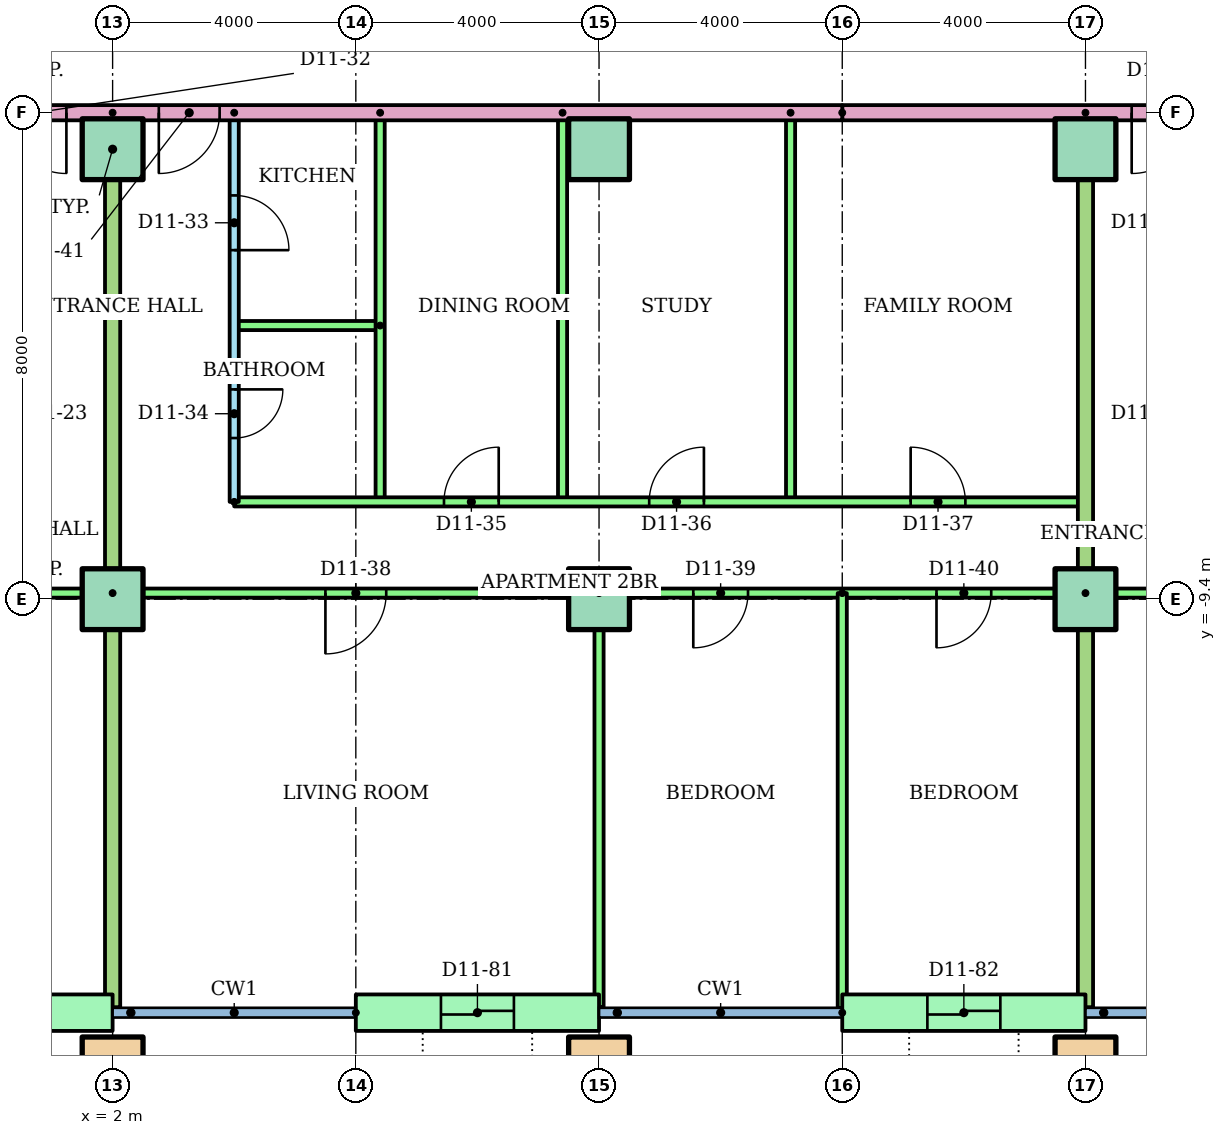
"""IFC4 building model, lengths in metres.
Left out: names, types, materials, properties, quantities, classifications, styles, units other than length and angle.
Written with IfcOpenShell. Run it as: python <this file> out.ifc"""

import sys

from ifc_helpers import new_model, si_unit, direction, frame, frame_2d, origin, origin_2d, place, context, subcontext, project, spatial, rectangle, hollow_rectangle, extrude, element, fill, save


model = new_model("IFC4")
c1 = context("Model", 3, precision=1e-05, world=origin(), true_north=direction((0.0, 1.0)))
c2 = subcontext(c1, "Body", "Model", "MODEL_VIEW")
j1 = project(units=[si_unit("LENGTHUNIT", "METRE"), si_unit("PLANEANGLEUNIT", "RADIAN")], contexts=[c1])
p1 = place(None, origin())
s1 = spatial("IfcSite", under=j1, at=p1, CompositionType="ELEMENT")
p2 = place(p1, origin())
s2 = spatial("IfcBuilding", under=s1, at=p2, CompositionType="ELEMENT")
p3 = place(p2, frame((0.0, 0.0, 44.8)))
s3 = spatial("IfcBuildingStorey", under=s2, at=p3, CompositionType="ELEMENT", Elevation=44.8)
for number, where in (
    (1, (2.0, -17.1, 0.0)),
    (2, (10.0, -17.1, 0.0)),
    (3, (18.0, -17.1, 0.0)),
):
    element("IfcColumn", number, at=place(p3, frame(where)), inside=s3, PredefinedType="COLUMN", context=c2, shape_type="SweptSolid", body=[
        extrude(hollow_rectangle(XDim=1.0, YDim=1.0, WallThickness=0.05, at=origin_2d()), origin(), (0.0, 0.0, 1.0), 3.2),
    ])
for number, where in (
    (4, (2.0, -9.4, 0.0)),
    (5, (10.0, -9.4, 0.0)),
    (6, (18.0, -9.4, 0.0)),
    (7, (2.0, -2.0, 0.0)),
    (8, (10.0, -2.0, 0.0)),
    (9, (18.0, -2.0, 0.0)),
):
    element("IfcColumn", number, at=place(p3, frame(where)), inside=s3, PredefinedType="COLUMN", context=c2, shape_type="SweptSolid", body=[
        extrude(rectangle(XDim=1.0, YDim=1.0, at=origin_2d()), origin(), (0.0, 0.0, 1.0), 3.2),
    ])
p4 = place(p3, frame((-2.0, -16.2, 0.0)))
e10 = element("IfcWall", 10, at=p4, inside=s3, PredefinedType="STANDARD", context=c2, shape_type="SweptSolid", body=[
    extrude(rectangle(XDim=4.0, YDim=0.6, at=frame_2d((2.0, 0.0))), origin(), (0.0, 0.0, 1.0), 2.92),
])
p5 = place(p4, frame((1.4, 0.0, 0.0)))
e11 = element("IfcOpeningElement", 11, at=p5, cuts=e10, PredefinedType="OPENING", context=c2, shape_type="SweptSolid", body=[
    extrude(rectangle(XDim=1.2, YDim=2.1, at=frame_2d((0.6, 1.05))), frame((0.0, 0.31, 0.0), z_axis=(0.0, -1.0, 0.0), x_axis=(1.0, 0.0, 0.0)), (0.0, 0.0, 1.0), 0.62),
])
p6 = place(p3, frame((6.0, -16.2, 0.0)))
e12 = element("IfcWall", 12, at=p6, inside=s3, PredefinedType="STANDARD", context=c2, shape_type="SweptSolid", body=[
    extrude(rectangle(XDim=4.0, YDim=0.6, at=frame_2d((2.0, 0.0))), origin(), (0.0, 0.0, 1.0), 2.92),
])
p7 = place(p6, frame((1.4, 0.0, 0.0)))
e13 = element("IfcOpeningElement", 13, at=p7, cuts=e12, PredefinedType="OPENING", context=c2, shape_type="SweptSolid", body=[
    extrude(rectangle(XDim=1.2, YDim=2.1, at=frame_2d((0.6, 1.05))), frame((0.0, 0.31, 0.0), z_axis=(0.0, -1.0, 0.0), x_axis=(1.0, 0.0, 0.0)), (0.0, 0.0, 1.0), 0.62),
])
p8 = place(p3, frame((14.0, -16.2, 0.0)))
e14 = element("IfcWall", 14, at=p8, inside=s3, PredefinedType="STANDARD", context=c2, shape_type="SweptSolid", body=[
    extrude(rectangle(XDim=4.0, YDim=0.6, at=frame_2d((2.0, 0.0))), origin(), (0.0, 0.0, 1.0), 2.92),
])
p9 = place(p8, frame((1.4, 0.0, 0.0)))
e15 = element("IfcOpeningElement", 15, at=p9, cuts=e14, PredefinedType="OPENING", context=c2, shape_type="SweptSolid", body=[
    extrude(rectangle(XDim=1.2, YDim=2.1, at=frame_2d((0.6, 1.05))), frame((0.0, 0.31, 0.0), z_axis=(0.0, -1.0, 0.0), x_axis=(1.0, 0.0, 0.0)), (0.0, 0.0, 1.0), 0.62),
])
p10 = place(p3, frame((2.0, -9.3, 0.0), z_axis=(0.0, 0.0, 1.0), x_axis=(-1.0, 0.0, 0.0)))
e16 = element("IfcWall", 16, at=p10, inside=s3, PredefinedType="PARTITIONING", context=c2, shape_type="SweptSolid", body=[
    extrude(rectangle(XDim=24.0, YDim=0.15, at=frame_2d((12.0, 0.0))), origin(), (0.0, 0.0, 1.0), 2.4),
])
p11 = place(p10, frame((19.5, 0.0, 0.0)))
e17 = element("IfcOpeningElement", 17, at=p11, cuts=e16, PredefinedType="OPENING", context=c2, shape_type="SweptSolid", body=[
    extrude(rectangle(XDim=1.0, YDim=2.1, at=frame_2d((0.5, 1.05))), frame((0.0, 0.085, 0.0), z_axis=(0.0, -1.0, 0.0), x_axis=(1.0, 0.0, 0.0)), (0.0, 0.0, 1.0), 0.17),
])
p12 = place(p10, frame((13.55, 0.0, 0.0)))
e18 = element("IfcOpeningElement", 18, at=p12, cuts=e16, PredefinedType="OPENING", context=c2, shape_type="SweptSolid", body=[
    extrude(rectangle(XDim=0.9, YDim=2.1, at=frame_2d((0.45, 1.05))), frame((0.0, 0.085, 0.0), z_axis=(0.0, -1.0, 0.0), x_axis=(1.0, 0.0, 0.0)), (0.0, 0.0, 1.0), 0.17),
])
p13 = place(p10, frame((9.55, 0.0, 0.0)))
e19 = element("IfcOpeningElement", 19, at=p13, cuts=e16, PredefinedType="OPENING", context=c2, shape_type="SweptSolid", body=[
    extrude(rectangle(XDim=0.9, YDim=2.1, at=frame_2d((0.45, 1.05))), frame((0.0, 0.085, 0.0), z_axis=(0.0, -1.0, 0.0), x_axis=(1.0, 0.0, 0.0)), (0.0, 0.0, 1.0), 0.17),
])
p14 = place(p10, frame((5.55, 0.0, 0.0)))
e20 = element("IfcOpeningElement", 20, at=p14, cuts=e16, PredefinedType="OPENING", context=c2, shape_type="SweptSolid", body=[
    extrude(rectangle(XDim=0.9, YDim=2.1, at=frame_2d((0.45, 1.05))), frame((0.0, 0.085, 0.0), z_axis=(0.0, -1.0, 0.0), x_axis=(1.0, 0.0, 0.0)), (0.0, 0.0, 1.0), 0.17),
])
p15 = place(p10, frame((1.55, 0.0, 0.0)))
e21 = element("IfcOpeningElement", 21, at=p15, cuts=e16, PredefinedType="OPENING", context=c2, shape_type="SweptSolid", body=[
    extrude(rectangle(XDim=0.9, YDim=2.1, at=frame_2d((0.45, 1.05))), frame((0.0, 0.085, 0.0), z_axis=(0.0, -1.0, 0.0), x_axis=(1.0, 0.0, 0.0)), (0.0, 0.0, 1.0), 0.17),
])
p16 = place(p3, frame((4.0, -1.4, 0.0), z_axis=(0.0, 0.0, 1.0), x_axis=(0.0, -1.0, 0.0)))
e22 = element("IfcWall", 22, at=p16, inside=s3, PredefinedType="PARTITIONING", context=c2, shape_type="SweptSolid", body=[
    extrude(rectangle(XDim=6.4, YDim=0.15, at=frame_2d((3.2, 0.0))), origin(), (0.0, 0.0, 1.0), 2.4),
])
p17 = place(p16, frame((1.36, 0.0, 0.0)))
e23 = element("IfcOpeningElement", 23, at=p17, cuts=e22, PredefinedType="OPENING", context=c2, shape_type="SweptSolid", body=[
    extrude(rectangle(XDim=0.9, YDim=2.1, at=frame_2d((0.45, 1.05))), frame((0.0, 0.085, 0.0), z_axis=(0.0, -1.0, 0.0), x_axis=(1.0, 0.0, 0.0)), (0.0, 0.0, 1.0), 0.17),
])
p18 = place(p16, frame((4.55, 0.0, 0.0)))
e24 = element("IfcOpeningElement", 24, at=p18, cuts=e22, PredefinedType="OPENING", context=c2, shape_type="SweptSolid", body=[
    extrude(rectangle(XDim=0.8, YDim=2.1, at=frame_2d((0.4, 1.05))), frame((0.0, 0.085, 0.0), z_axis=(0.0, -1.0, 0.0), x_axis=(1.0, 0.0, 0.0)), (0.0, 0.0, 1.0), 0.17),
])
p19 = place(p3, frame((6.4, -4.9, 0.0), z_axis=(0.0, 0.0, 1.0), x_axis=(-1.0, 0.0, 0.0)))
e25 = element("IfcWall", 25, at=p19, inside=s3, PredefinedType="PARTITIONING", context=c2, shape_type="SweptSolid", body=[
    extrude(rectangle(XDim=2.4, YDim=0.15, at=frame_2d((1.2, 0.0))), origin(), (0.0, 0.0, 1.0), 2.4),
])
for number, where, z_axis, x_axis in (
    (26, (6.4, -1.4, 0.0), (0.0, 0.0, 1.0), (0.0, -1.0, 0.0)),
    (27, (9.4, -1.4, 0.0), (0.0, 0.0, 1.0), (0.0, -1.0, 0.0)),
    (28, (13.15, -1.4, 0.0), (0.0, 0.0, 1.0), (0.0, -1.0, 0.0)),
):
    element("IfcWall", number, at=place(p3, frame(where, z_axis=z_axis, x_axis=x_axis)), inside=s3, PredefinedType="PARTITIONING", context=c2, shape_type="SweptSolid", body=[
        extrude(rectangle(XDim=6.4, YDim=0.15, at=frame_2d((3.2, 0.0))), origin(), (0.0, 0.0, 1.0), 2.4),
    ])
p20 = place(p3, frame((4.0, -7.8, 0.0)))
e29 = element("IfcWall", 29, at=p20, inside=s3, PredefinedType="PARTITIONING", context=c2, shape_type="SweptSolid", body=[
    extrude(rectangle(XDim=14.0, YDim=0.15, at=frame_2d((7.0, 0.0))), origin(), (0.0, 0.0, 1.0), 2.4),
])
p21 = place(p20, frame((3.45, 0.0, 0.0)))
e30 = element("IfcOpeningElement", 30, at=p21, cuts=e29, PredefinedType="OPENING", context=c2, shape_type="SweptSolid", body=[
    extrude(rectangle(XDim=0.9, YDim=2.1, at=frame_2d((0.45, 1.05))), frame((0.0, 0.085, 0.0), z_axis=(0.0, -1.0, 0.0), x_axis=(1.0, 0.0, 0.0)), (0.0, 0.0, 1.0), 0.17),
])
p22 = place(p20, frame((6.825, 0.0, 0.0)))
e31 = element("IfcOpeningElement", 31, at=p22, cuts=e29, PredefinedType="OPENING", context=c2, shape_type="SweptSolid", body=[
    extrude(rectangle(XDim=0.9, YDim=2.1, at=frame_2d((0.45, 1.05))), frame((0.0, 0.085, 0.0), z_axis=(0.0, -1.0, 0.0), x_axis=(1.0, 0.0, 0.0)), (0.0, 0.0, 1.0), 0.17),
])
p23 = place(p20, frame((11.125, 0.0, 0.0)))
e32 = element("IfcOpeningElement", 32, at=p23, cuts=e29, PredefinedType="OPENING", context=c2, shape_type="SweptSolid", body=[
    extrude(rectangle(XDim=0.9, YDim=2.1, at=frame_2d((0.45, 1.05))), frame((0.0, 0.085, 0.0), z_axis=(0.0, -1.0, 0.0), x_axis=(1.0, 0.0, 0.0)), (0.0, 0.0, 1.0), 0.17),
])
p24 = place(p3, frame((18.0, -9.3, 0.0), z_axis=(0.0, 0.0, 1.0), x_axis=(-1.0, 0.0, 0.0)))
e33 = element("IfcWall", 33, at=p24, inside=s3, PredefinedType="PARTITIONING", context=c2, shape_type="SweptSolid", body=[
    extrude(rectangle(XDim=16.0, YDim=0.15, at=frame_2d((8.0, 0.0))), origin(), (0.0, 0.0, 1.0), 2.4),
])
p25 = place(p24, frame((11.5, 0.0, 0.0)))
e34 = element("IfcOpeningElement", 34, at=p25, cuts=e33, PredefinedType="OPENING", context=c2, shape_type="SweptSolid", body=[
    extrude(rectangle(XDim=1.0, YDim=2.1, at=frame_2d((0.5, 1.05))), frame((0.0, 0.085, 0.0), z_axis=(0.0, -1.0, 0.0), x_axis=(1.0, 0.0, 0.0)), (0.0, 0.0, 1.0), 0.17),
])
p26 = place(p24, frame((5.55, 0.0, 0.0)))
e35 = element("IfcOpeningElement", 35, at=p26, cuts=e33, PredefinedType="OPENING", context=c2, shape_type="SweptSolid", body=[
    extrude(rectangle(XDim=0.9, YDim=2.1, at=frame_2d((0.45, 1.05))), frame((0.0, 0.085, 0.0), z_axis=(0.0, -1.0, 0.0), x_axis=(1.0, 0.0, 0.0)), (0.0, 0.0, 1.0), 0.17),
])
p27 = place(p24, frame((1.55, 0.0, 0.0)))
e36 = element("IfcOpeningElement", 36, at=p27, cuts=e33, PredefinedType="OPENING", context=c2, shape_type="SweptSolid", body=[
    extrude(rectangle(XDim=0.9, YDim=2.1, at=frame_2d((0.45, 1.05))), frame((0.0, 0.085, 0.0), z_axis=(0.0, -1.0, 0.0), x_axis=(1.0, 0.0, 0.0)), (0.0, 0.0, 1.0), 0.17),
])
p28 = place(p3, frame((10.0, -9.3, 0.0), z_axis=(0.0, 0.0, 1.0), x_axis=(0.0, -1.0, 0.0)))
e37 = element("IfcWall", 37, at=p28, inside=s3, PredefinedType="PARTITIONING", context=c2, shape_type="SweptSolid", body=[
    extrude(rectangle(XDim=6.81, YDim=0.15, at=frame_2d((3.405, 0.0))), origin(), (0.0, 0.0, 1.0), 2.4),
])
p29 = place(p3, frame((14.0, -9.3, 0.0), z_axis=(0.0, 0.0, 1.0), x_axis=(0.0, -1.0, 0.0)))
e38 = element("IfcWall", 38, at=p29, inside=s3, PredefinedType="PARTITIONING", context=c2, shape_type="SweptSolid", body=[
    extrude(rectangle(XDim=6.821, YDim=0.15, at=frame_2d((3.411, 0.0))), origin(), (0.0, 0.0, 1.0), 2.4),
])
p30 = place(p3, frame((2.0, -1.4, 0.0), z_axis=(0.0, 0.0, 1.0), x_axis=(0.0, -1.0, 0.0)))
e39 = element("IfcWall", 39, at=p30, inside=s3, PredefinedType="PARTITIONING", context=c2, shape_type="SweptSolid", body=[
    extrude(rectangle(XDim=14.71, YDim=0.25, at=frame_2d((7.355, 0.0))), origin(), (0.0, 0.0, 1.0), 2.4),
])
p31 = place(p3, frame((36.52, -9.3, 0.0), z_axis=(0.0, 0.0, 1.0), x_axis=(-1.0, 0.0, 0.0)))
e40 = element("IfcWall", 40, at=p31, inside=s3, PredefinedType="PARTITIONING", context=c2, shape_type="SweptSolid", body=[
    extrude(rectangle(XDim=18.52, YDim=0.15, at=frame_2d((9.26, 0.0))), origin(), (0.0, 0.0, 1.0), 2.4),
])
p32 = place(p31, frame((16.07, 0.0, 0.0)))
e41 = element("IfcOpeningElement", 41, at=p32, cuts=e40, PredefinedType="OPENING", context=c2, shape_type="SweptSolid", body=[
    extrude(rectangle(XDim=0.9, YDim=2.1, at=frame_2d((0.45, 1.05))), frame((0.0, 0.085, 0.0), z_axis=(0.0, -1.0, 0.0), x_axis=(1.0, 0.0, 0.0)), (0.0, 0.0, 1.0), 0.17),
])
p33 = place(p31, frame((12.02, 0.0, 0.0)))
e42 = element("IfcOpeningElement", 42, at=p33, cuts=e40, PredefinedType="OPENING", context=c2, shape_type="SweptSolid", body=[
    extrude(rectangle(XDim=1.0, YDim=2.1, at=frame_2d((0.5, 1.05))), frame((0.0, 0.085, 0.0), z_axis=(0.0, -1.0, 0.0), x_axis=(1.0, 0.0, 0.0)), (0.0, 0.0, 1.0), 0.17),
])
p34 = place(p31, frame((7.17, 0.0, 0.0)))
e43 = element("IfcOpeningElement", 43, at=p34, cuts=e40, PredefinedType="OPENING", context=c2, shape_type="SweptSolid", body=[
    extrude(rectangle(XDim=0.9, YDim=2.1, at=frame_2d((0.45, 1.05))), frame((0.0, 0.085, 0.0), z_axis=(0.0, -1.0, 0.0), x_axis=(1.0, 0.0, 0.0)), (0.0, 0.0, 1.0), 0.17),
])
p35 = place(p31, frame((0.86, 0.0, 0.0)))
e44 = element("IfcOpeningElement", 44, at=p35, cuts=e40, PredefinedType="OPENING", context=c2, shape_type="SweptSolid", body=[
    extrude(rectangle(XDim=0.9, YDim=2.1, at=frame_2d((0.45, 1.05))), frame((0.0, 0.085, 0.0), z_axis=(0.0, -1.0, 0.0), x_axis=(1.0, 0.0, 0.0)), (0.0, 0.0, 1.0), 0.17),
])
p36 = place(p3, frame((18.0, -1.4, 0.0), z_axis=(0.0, 0.0, 1.0), x_axis=(0.0, -1.0, 0.0)))
e45 = element("IfcWall", 45, at=p36, inside=s3, PredefinedType="PARTITIONING", context=c2, shape_type="SweptSolid", body=[
    extrude(rectangle(XDim=14.71, YDim=0.25, at=frame_2d((7.355, 0.0))), origin(), (0.0, 0.0, 1.0), 2.4),
])
p37 = place(p3, frame((29.0, -1.4, 0.0), z_axis=(0.0, 0.0, 1.0), x_axis=(-1.0, 0.0, 0.0)))
e46 = element("IfcWall", 46, at=p37, inside=s3, PredefinedType="PARTITIONING", context=c2, shape_type="SweptSolid", body=[
    extrude(rectangle(XDim=15.0, YDim=0.25, at=frame_2d((7.5, 0.0))), origin(), (0.0, 0.0, 1.0), 2.4),
])
p38 = place(p37, frame((9.24, 0.0, 0.0)))
e47 = element("IfcOpeningElement", 47, at=p38, cuts=e46, PredefinedType="OPENING", context=c2, shape_type="SweptSolid", body=[
    extrude(rectangle(XDim=1.0, YDim=2.1, at=frame_2d((0.5, 1.05))), frame((0.0, 0.135, 0.0), z_axis=(0.0, -1.0, 0.0), x_axis=(1.0, 0.0, 0.0)), (0.0, 0.0, 1.0), 0.27),
])
p39 = place(p3, frame((14.0, -1.4, 0.0), z_axis=(0.0, 0.0, 1.0), x_axis=(-1.0, 0.0, 0.0)))
e48 = element("IfcWall", 48, at=p39, inside=s3, PredefinedType="PARTITIONING", context=c2, shape_type="SweptSolid", body=[
    extrude(rectangle(XDim=28.0, YDim=0.25, at=frame_2d((14.0, 0.0))), origin(), (0.0, 0.0, 1.0), 2.4),
])
p40 = place(p39, frame((12.76, 0.0, 0.0)))
e49 = element("IfcOpeningElement", 49, at=p40, cuts=e48, PredefinedType="OPENING", context=c2, shape_type="SweptSolid", body=[
    extrude(rectangle(XDim=1.0, YDim=2.1, at=frame_2d((0.5, 1.05))), frame((0.0, 0.135, 0.0), z_axis=(0.0, -1.0, 0.0), x_axis=(1.0, 0.0, 0.0)), (0.0, 0.0, 1.0), 0.27),
])
p41 = place(p39, frame((10.24, 0.0, 0.0)))
e50 = element("IfcOpeningElement", 50, at=p41, cuts=e48, PredefinedType="OPENING", context=c2, shape_type="SweptSolid", body=[
    extrude(rectangle(XDim=1.0, YDim=2.1, at=frame_2d((0.5, 1.05))), frame((0.0, 0.135, 0.0), z_axis=(0.0, -1.0, 0.0), x_axis=(1.0, 0.0, 0.0)), (0.0, 0.0, 1.0), 0.27),
])
p42 = place(p40, origin())
e51 = element("IfcDoor", 51, at=p42, inside=s3, OperationType="SINGLE_SWING_LEFT", PredefinedType="DOOR", context=c2, shape_type="SweptSolid", body=[
    extrude(rectangle(XDim=1.0, YDim=2.1, at=frame_2d((0.5, 1.05))), frame((0.0, 0.025, 0.0), z_axis=(0.0, -1.0, 0.0), x_axis=(1.0, 0.0, 0.0)), (0.0, 0.0, 1.0), 0.05),
])
fill(e49, e51)
p43 = place(p17, origin())
e52 = element("IfcDoor", 52, at=p43, inside=s3, OperationType="SINGLE_SWING_RIGHT", PredefinedType="DOOR", context=c2, shape_type="SweptSolid", body=[
    extrude(rectangle(XDim=0.9, YDim=2.1, at=frame_2d((0.45, 1.05))), frame((0.0, 0.025, 0.0), z_axis=(0.0, -1.0, 0.0), x_axis=(1.0, 0.0, 0.0)), (0.0, 0.0, 1.0), 0.05),
])
fill(e23, e52)
p44 = place(p18, origin())
e53 = element("IfcDoor", 53, at=p44, inside=s3, OperationType="SINGLE_SWING_LEFT", PredefinedType="DOOR", context=c2, shape_type="SweptSolid", body=[
    extrude(rectangle(XDim=0.8, YDim=2.1, at=frame_2d((0.4, 1.05))), frame((0.0, 0.025, 0.0), z_axis=(0.0, -1.0, 0.0), x_axis=(1.0, 0.0, 0.0)), (0.0, 0.0, 1.0), 0.05),
])
fill(e24, e53)
p45 = place(p21, origin())
e54 = element("IfcDoor", 54, at=p45, inside=s3, OperationType="SINGLE_SWING_RIGHT", PredefinedType="DOOR", context=c2, shape_type="SweptSolid", body=[
    extrude(rectangle(XDim=0.9, YDim=2.1, at=frame_2d((0.45, 1.05))), frame((0.0, 0.025, 0.0), z_axis=(0.0, -1.0, 0.0), x_axis=(1.0, 0.0, 0.0)), (0.0, 0.0, 1.0), 0.05),
])
fill(e30, e54)
p46 = place(p22, origin())
e55 = element("IfcDoor", 55, at=p46, inside=s3, OperationType="SINGLE_SWING_RIGHT", PredefinedType="DOOR", context=c2, shape_type="SweptSolid", body=[
    extrude(rectangle(XDim=0.9, YDim=2.1, at=frame_2d((0.45, 1.05))), frame((0.0, 0.025, 0.0), z_axis=(0.0, -1.0, 0.0), x_axis=(1.0, 0.0, 0.0)), (0.0, 0.0, 1.0), 0.05),
])
fill(e31, e55)
p47 = place(p23, origin())
e56 = element("IfcDoor", 56, at=p47, inside=s3, OperationType="SINGLE_SWING_LEFT", PredefinedType="DOOR", context=c2, shape_type="SweptSolid", body=[
    extrude(rectangle(XDim=0.9, YDim=2.1, at=frame_2d((0.45, 1.05))), frame((0.0, 0.025, 0.0), z_axis=(0.0, -1.0, 0.0), x_axis=(1.0, 0.0, 0.0)), (0.0, 0.0, 1.0), 0.05),
])
fill(e32, e56)
p48 = place(p25, origin())
e57 = element("IfcDoor", 57, at=p48, inside=s3, OperationType="SINGLE_SWING_RIGHT", PredefinedType="DOOR", context=c2, shape_type="SweptSolid", body=[
    extrude(rectangle(XDim=1.0, YDim=2.1, at=frame_2d((0.5, 1.05))), frame((0.0, 0.025, 0.0), z_axis=(0.0, -1.0, 0.0), x_axis=(1.0, 0.0, 0.0)), (0.0, 0.0, 1.0), 0.05),
])
fill(e34, e57)
p49 = place(p26, origin())
e58 = element("IfcDoor", 58, at=p49, inside=s3, OperationType="SINGLE_SWING_RIGHT", PredefinedType="DOOR", context=c2, shape_type="SweptSolid", body=[
    extrude(rectangle(XDim=0.9, YDim=2.1, at=frame_2d((0.45, 1.05))), frame((0.0, 0.025, 0.0), z_axis=(0.0, -1.0, 0.0), x_axis=(1.0, 0.0, 0.0)), (0.0, 0.0, 1.0), 0.05),
])
fill(e35, e58)
p50 = place(p27, origin())
e59 = element("IfcDoor", 59, at=p50, inside=s3, OperationType="SINGLE_SWING_RIGHT", PredefinedType="DOOR", context=c2, shape_type="SweptSolid", body=[
    extrude(rectangle(XDim=0.9, YDim=2.1, at=frame_2d((0.45, 1.05))), frame((0.0, 0.025, 0.0), z_axis=(0.0, -1.0, 0.0), x_axis=(1.0, 0.0, 0.0)), (0.0, 0.0, 1.0), 0.05),
])
fill(e36, e59)
p51 = place(p41, origin())
e60 = element("IfcDoor", 60, at=p51, inside=s3, OperationType="SINGLE_SWING_RIGHT", PredefinedType="DOOR", context=c2, shape_type="SweptSolid", body=[
    extrude(rectangle(XDim=1.0, YDim=2.1, at=frame_2d((0.5, 1.05))), frame((0.0, 0.025, 0.0), z_axis=(0.0, -1.0, 0.0), x_axis=(1.0, 0.0, 0.0)), (0.0, 0.0, 1.0), 0.05),
])
fill(e50, e60)
p52 = place(p38, origin())
e61 = element("IfcDoor", 61, at=p52, inside=s3, OperationType="SINGLE_SWING_RIGHT", PredefinedType="DOOR", context=c2, shape_type="SweptSolid", body=[
    extrude(rectangle(XDim=1.0, YDim=2.1, at=frame_2d((0.5, 1.05))), frame((0.0, 0.025, 0.0), z_axis=(0.0, -1.0, 0.0), x_axis=(1.0, 0.0, 0.0)), (0.0, 0.0, 1.0), 0.05),
])
fill(e47, e61)
p53 = place(p7, origin())
e62 = element("IfcDoor", 62, at=p53, inside=s3, OperationType="SLIDING_TO_LEFT", PredefinedType="DOOR", context=c2, shape_type="SweptSolid", body=[
    extrude(rectangle(XDim=1.2, YDim=2.1, at=frame_2d((0.6, 1.05))), frame((0.0, 0.025, 0.0), z_axis=(0.0, -1.0, 0.0), x_axis=(1.0, 0.0, 0.0)), (0.0, 0.0, 1.0), 0.05),
])
fill(e13, e62)
p54 = place(p9, origin())
e63 = element("IfcDoor", 63, at=p54, inside=s3, OperationType="SLIDING_TO_LEFT", PredefinedType="DOOR", context=c2, shape_type="SweptSolid", body=[
    extrude(rectangle(XDim=1.2, YDim=2.1, at=frame_2d((0.6, 1.05))), frame((0.0, 0.025, 0.0), z_axis=(0.0, -1.0, 0.0), x_axis=(1.0, 0.0, 0.0)), (0.0, 0.0, 1.0), 0.05),
])
fill(e15, e63)
save(model, sys.argv[1])
